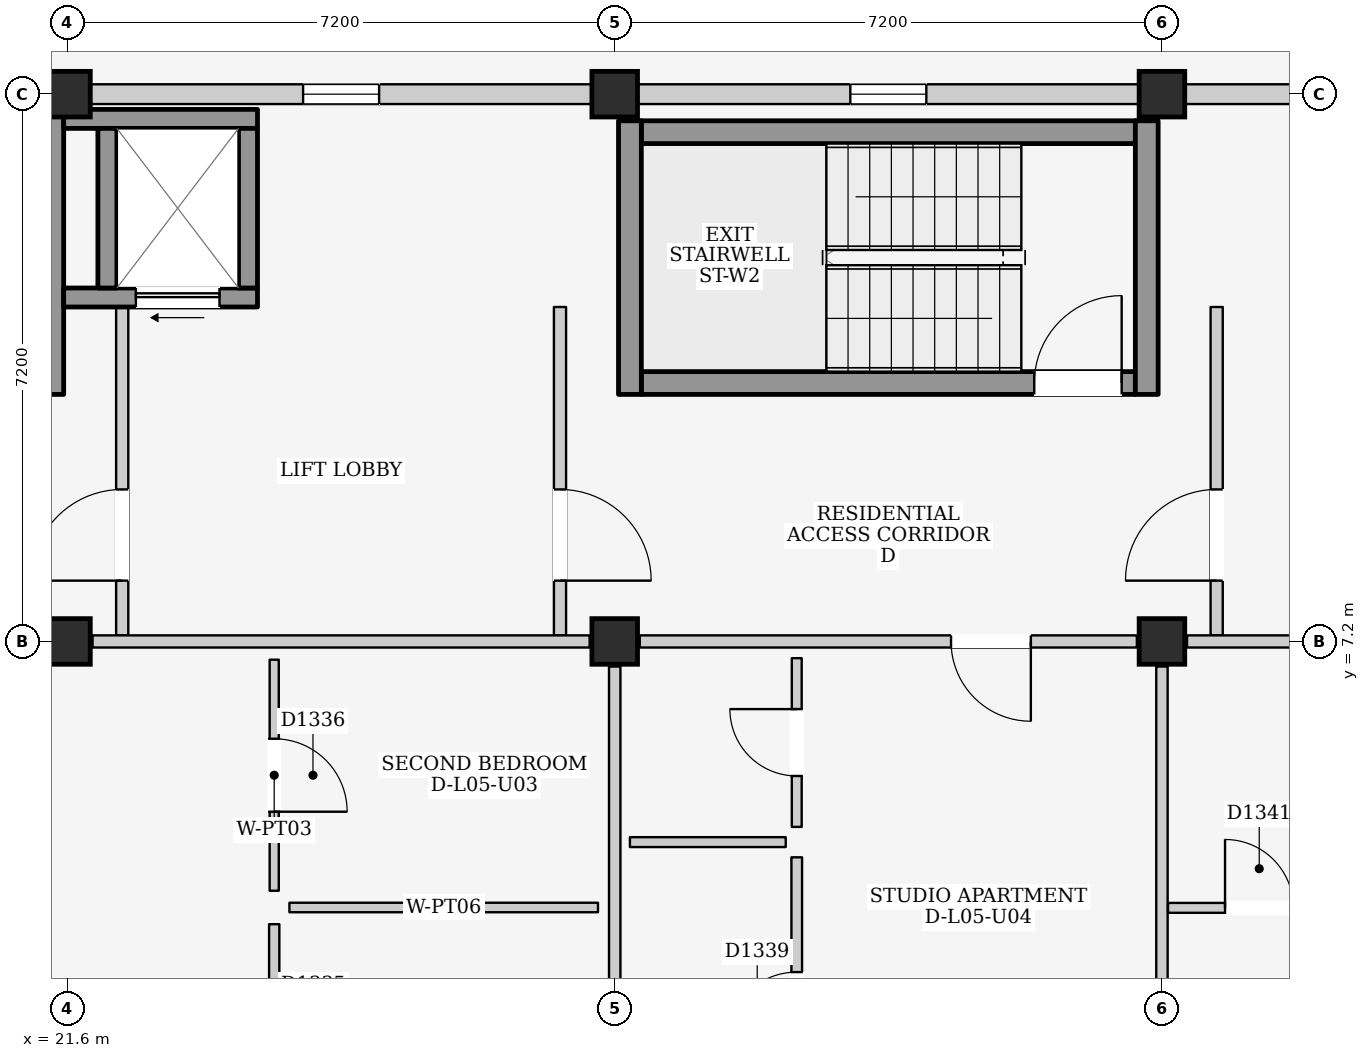
"""IFC4 building model, lengths in metres.
Left out: names, types, materials, properties, quantities, classifications, styles, units other than length and angle.
Written with IfcOpenShell. Run it as: python <this file> out.ifc"""

import sys

from ifc_helpers import new_model, si_unit, direction, frame, frame_2d, origin, origin_2d, place, context, subcontext, project, spatial, rectangle, extrude, element, fill, save


model = new_model("IFC4")
c1 = context("Model", 3, precision=1e-05, world=origin(), true_north=direction((0.0, 1.0)))
c2 = subcontext(c1, "Body", "Model", "MODEL_VIEW")
j1 = project(units=[si_unit("LENGTHUNIT", "METRE"), si_unit("PLANEANGLEUNIT", "RADIAN")], contexts=[c1])
p1 = place(None, origin())
s1 = spatial("IfcSite", under=j1, at=p1, CompositionType="ELEMENT")
p2 = place(p1, origin())
s2 = spatial("IfcBuilding", under=s1, at=p2, CompositionType="ELEMENT")
p3 = place(p2, frame((0.0, 0.0, 18.6)))
s3 = spatial("IfcBuildingStorey", under=s2, at=p3, CompositionType="ELEMENT", Elevation=18.6)
for number, where, z_axis, x_axis in (
    (1, (21.6, 7.2, 0.0), (0.0, 0.0, 1.0), (1.0, 0.0, 0.0)),
    (2, (21.6, 14.4, 0.0), (0.0, 0.0, 1.0), (1.0, 0.0, 0.0)),
    (3, (28.8, 7.2, 0.0), (0.0, 0.0, 1.0), (1.0, 0.0, 0.0)),
    (4, (28.8, 14.4, 0.0), (0.0, 0.0, 1.0), (1.0, 0.0, 0.0)),
    (5, (36.0, 7.2, 0.0), (0.0, 0.0, 1.0), (1.0, 0.0, 0.0)),
    (6, (36.0, 14.4, 0.0), (0.0, 0.0, 1.0), (1.0, 0.0, 0.0)),
):
    element("IfcColumn", number, at=place(p3, frame(where, z_axis=z_axis, x_axis=x_axis)), inside=s3, PredefinedType="COLUMN", context=c2, shape_type="SweptSolid", body=[
        extrude(rectangle(XDim=0.6, YDim=0.6, at=origin_2d()), origin(), (0.0, 0.0, 1.0), 3.3),
    ])
p4 = place(p3, frame((21.9, 14.4, 0.0), z_axis=(0.0, 0.0, 1.0), x_axis=(1.0, 0.0, 0.0)))
e7 = element("IfcWall", 7, at=p4, inside=s3, PredefinedType="ELEMENTEDWALL", context=c2, shape_type="SweptSolid", body=[
    extrude(rectangle(XDim=6.6, YDim=0.26, at=frame_2d((3.3, 0.0))), origin(), (0.0, 0.0, 1.0), 2.445),
])
p5 = place(p4, frame((2.8, 0.0, 1.2)))
e8 = element("IfcOpeningElement", 8, at=p5, cuts=e7, PredefinedType="OPENING", context=c2, shape_type="SweptSolid", body=[
    extrude(rectangle(XDim=1.0, YDim=0.9, at=frame_2d((0.5, 0.45))), frame((0.0, 0.145, 0.0), z_axis=(0.0, -1.0, 0.0), x_axis=(1.0, 0.0, 0.0)), (0.0, 0.0, 1.0), 0.29),
])
p6 = place(p3, frame((29.1, 14.4, 0.0), z_axis=(0.0, 0.0, 1.0), x_axis=(1.0, 0.0, 0.0)))
e9 = element("IfcWall", 9, at=p6, inside=s3, PredefinedType="ELEMENTEDWALL", context=c2, shape_type="SweptSolid", body=[
    extrude(rectangle(XDim=6.6, YDim=0.26, at=frame_2d((3.3, 0.0))), origin(), (0.0, 0.0, 1.0), 2.445),
])
p7 = place(p6, frame((2.8, 0.0, 1.2)))
e10 = element("IfcOpeningElement", 10, at=p7, cuts=e9, PredefinedType="OPENING", context=c2, shape_type="SweptSolid", body=[
    extrude(rectangle(XDim=1.0, YDim=0.9, at=frame_2d((0.5, 0.45))), frame((0.0, 0.145, 0.0), z_axis=(0.0, -1.0, 0.0), x_axis=(1.0, 0.0, 0.0)), (0.0, 0.0, 1.0), 0.29),
])
p8 = place(p3, frame((36.3, 14.4, 0.0), z_axis=(0.0, 0.0, 1.0), x_axis=(1.0, 0.0, 0.0)))
e11 = element("IfcWall", 11, at=p8, inside=s3, PredefinedType="ELEMENTEDWALL", context=c2, shape_type="SweptSolid", body=[
    extrude(rectangle(XDim=6.6, YDim=0.26, at=frame_2d((3.3, 0.0))), origin(), (0.0, 0.0, 1.0), 2.445),
])
p9 = place(p8, frame((2.8, 0.0, 1.2)))
e12 = element("IfcOpeningElement", 12, at=p9, cuts=e11, PredefinedType="OPENING", context=c2, shape_type="SweptSolid", body=[
    extrude(rectangle(XDim=1.0, YDim=0.9, at=frame_2d((0.5, 0.45))), frame((0.0, 0.145, 0.0), z_axis=(0.0, -1.0, 0.0), x_axis=(1.0, 0.0, 0.0)), (0.0, 0.0, 1.0), 0.29),
])
p10 = place(p3, frame((21.4, 10.45, 0.0), z_axis=(0.0, 0.0, 1.0), x_axis=(0.0, 1.0, 0.0)))
e13 = element("IfcWall", 13, at=p10, inside=s3, PredefinedType="SHEAR", context=c2, shape_type="SweptSolid", body=[
    extrude(rectangle(XDim=3.75, YDim=0.3, at=frame_2d((1.875, 0.0))), origin(), (0.0, 0.0, 1.0), 3.06),
])
p11 = place(p3, frame((22.32, 7.28, 0.0), z_axis=(0.0, 0.0, 1.0), x_axis=(0.0, 1.0, 0.0)))
e14 = element("IfcWall", 14, at=p11, inside=s3, PredefinedType="PARTITIONING", context=c2, shape_type="SweptSolid", body=[
    extrude(rectangle(XDim=4.32, YDim=0.16, at=frame_2d((2.16, 0.0))), origin(), (0.0, 0.0, 1.0), 3.06),
])
p12 = place(p11, frame((0.72, 0.0, 0.0)))
e15 = element("IfcOpeningElement", 15, at=p12, cuts=e14, PredefinedType="OPENING", context=c2, shape_type="SweptSolid", body=[
    extrude(rectangle(XDim=1.2, YDim=2.2, at=frame_2d((0.6, 1.1))), frame((0.0, 0.095, 0.0), z_axis=(0.0, -1.0, 0.0), x_axis=(1.0, 0.0, 0.0)), (0.0, 0.0, 1.0), 0.19),
])
p13 = place(p3, frame((28.08, 7.28, 0.0), z_axis=(0.0, 0.0, 1.0), x_axis=(0.0, 1.0, 0.0)))
e16 = element("IfcWall", 16, at=p13, inside=s3, PredefinedType="PARTITIONING", context=c2, shape_type="SweptSolid", body=[
    extrude(rectangle(XDim=4.32, YDim=0.16, at=frame_2d((2.16, 0.0))), origin(), (0.0, 0.0, 1.0), 3.06),
])
p14 = place(p13, frame((0.72, 0.0, 0.0)))
e17 = element("IfcOpeningElement", 17, at=p14, cuts=e16, PredefinedType="OPENING", context=c2, shape_type="SweptSolid", body=[
    extrude(rectangle(XDim=1.2, YDim=2.2, at=frame_2d((0.6, 1.1))), frame((0.0, 0.095, 0.0), z_axis=(0.0, -1.0, 0.0), x_axis=(1.0, 0.0, 0.0)), (0.0, 0.0, 1.0), 0.19),
])
p15 = place(p3, frame((21.55, 11.725, 0.0), z_axis=(0.0, 0.0, 1.0), x_axis=(1.0, 0.0, 0.0)))
e18 = element("IfcWall", 18, at=p15, inside=s3, PredefinedType="SHEAR", context=c2, shape_type="SweptSolid", body=[
    extrude(rectangle(XDim=2.55, YDim=0.25, at=frame_2d((1.275, 0.0))), origin(), (0.0, 0.0, 1.0), 3.06),
])
p16 = place(p15, frame((0.95, 0.0, 0.0)))
e19 = element("IfcOpeningElement", 19, at=p16, cuts=e18, PredefinedType="OPENING", context=c2, shape_type="SweptSolid", body=[
    extrude(rectangle(XDim=1.1, YDim=2.15, at=frame_2d((0.55, 1.075))), frame((0.0, 0.14, 0.0), z_axis=(0.0, -1.0, 0.0), x_axis=(1.0, 0.0, 0.0)), (0.0, 0.0, 1.0), 0.28),
])
p17 = place(p3, frame((21.55, 14.075, 0.0), z_axis=(0.0, 0.0, 1.0), x_axis=(1.0, 0.0, 0.0)))
e20 = element("IfcWall", 20, at=p17, inside=s3, PredefinedType="SHEAR", context=c2, shape_type="SweptSolid", body=[
    extrude(rectangle(XDim=2.55, YDim=0.25, at=frame_2d((1.275, 0.0))), origin(), (0.0, 0.0, 1.0), 3.06),
])
for number, where, z_axis, x_axis in (
    (21, (22.125, 11.85, 0.0), (0.0, 0.0, 1.0), (0.0, 1.0, 0.0)),
    (22, (23.975, 11.85, 0.0), (0.0, 0.0, 1.0), (0.0, 1.0, 0.0)),
):
    element("IfcWall", number, at=place(p3, frame(where, z_axis=z_axis, x_axis=x_axis)), inside=s3, PredefinedType="SHEAR", context=c2, shape_type="SweptSolid", body=[
        extrude(rectangle(XDim=2.1, YDim=0.25, at=frame_2d((1.05, 0.0))), origin(), (0.0, 0.0, 1.0), 3.06),
    ])
p18 = place(p3, frame((29.15, 10.6, 0.0), z_axis=(0.0, 0.0, 1.0), x_axis=(1.0, 0.0, 0.0)))
e23 = element("IfcWall", 23, at=p18, inside=s3, PredefinedType="SHEAR", context=c2, shape_type="SweptSolid", body=[
    extrude(rectangle(XDim=6.5, YDim=0.3, at=frame_2d((3.25, 0.0))), origin(), (0.0, 0.0, 1.0), 3.06),
])
p19 = place(p18, frame((5.17, 0.0, 0.0)))
e24 = element("IfcOpeningElement", 24, at=p19, cuts=e23, PredefinedType="OPENING", context=c2, shape_type="SweptSolid", body=[
    extrude(rectangle(XDim=1.15, YDim=2.2, at=frame_2d((0.575, 1.1))), frame((0.0, 0.165, 0.0), z_axis=(0.0, -1.0, 0.0), x_axis=(1.0, 0.0, 0.0)), (0.0, 0.0, 1.0), 0.33),
])
p20 = place(p3, frame((29.15, 13.9, 0.0), z_axis=(0.0, 0.0, 1.0), x_axis=(1.0, 0.0, 0.0)))
e25 = element("IfcWall", 25, at=p20, inside=s3, PredefinedType="SHEAR", context=c2, shape_type="SweptSolid", body=[
    extrude(rectangle(XDim=6.5, YDim=0.3, at=frame_2d((3.25, 0.0))), origin(), (0.0, 0.0, 1.0), 3.06),
])
for number, where, z_axis, x_axis in (
    (26, (29.0, 10.45, 0.0), (0.0, 0.0, 1.0), (0.0, 1.0, 0.0)),
    (27, (35.8, 10.45, 0.0), (0.0, 0.0, 1.0), (0.0, 1.0, 0.0)),
):
    element("IfcWall", number, at=place(p3, frame(where, z_axis=z_axis, x_axis=x_axis)), inside=s3, PredefinedType="SHEAR", context=c2, shape_type="SweptSolid", body=[
        extrude(rectangle(XDim=3.6, YDim=0.3, at=frame_2d((1.8, 0.0))), origin(), (0.0, 0.0, 1.0), 3.06),
    ])
p21 = place(p3, frame((36.72, 7.28, 0.0), z_axis=(0.0, 0.0, 1.0), x_axis=(0.0, 1.0, 0.0)))
e28 = element("IfcWall", 28, at=p21, inside=s3, PredefinedType="PARTITIONING", context=c2, shape_type="SweptSolid", body=[
    extrude(rectangle(XDim=4.32, YDim=0.16, at=frame_2d((2.16, 0.0))), origin(), (0.0, 0.0, 1.0), 3.06),
])
p22 = place(p21, frame((0.72, 0.0, 0.0)))
e29 = element("IfcOpeningElement", 29, at=p22, cuts=e28, PredefinedType="OPENING", context=c2, shape_type="SweptSolid", body=[
    extrude(rectangle(XDim=1.2, YDim=2.2, at=frame_2d((0.6, 1.1))), frame((0.0, 0.095, 0.0), z_axis=(0.0, -1.0, 0.0), x_axis=(1.0, 0.0, 0.0)), (0.0, 0.0, 1.0), 0.19),
])
p23 = place(p3, frame((21.93, 7.2, 0.0), z_axis=(0.0, 0.0, 1.0), x_axis=(1.0, 0.0, 0.0)))
e30 = element("IfcWall", 30, at=p23, inside=s3, PredefinedType="PARTITIONING", context=c2, shape_type="SweptSolid", body=[
    extrude(rectangle(XDim=6.54, YDim=0.16, at=frame_2d((3.27, 0.0))), origin(), (0.0, 0.0, 1.0), 2.445),
])
p24 = place(p3, frame((28.8, 0.33, 0.0), z_axis=(0.0, 0.0, 1.0), x_axis=(0.0, 1.0, 0.0)))
e31 = element("IfcWall", 31, at=p24, inside=s3, PredefinedType="PARTITIONING", context=c2, shape_type="SweptSolid", body=[
    extrude(rectangle(XDim=6.54, YDim=0.15, at=frame_2d((3.27, 0.0))), origin(), (0.0, 0.0, 1.0), 2.545),
])
p25 = place(p3, frame((24.32, 0.44, 0.0), z_axis=(0.0, 0.0, 1.0), x_axis=(0.0, 1.0, 0.0)))
e32 = element("IfcWall", 32, at=p25, inside=s3, PredefinedType="PARTITIONING", context=c2, shape_type="SweptSolid", body=[
    extrude(rectangle(XDim=3.04, YDim=0.135, at=frame_2d((1.52, 0.0))), origin(), (0.0, 0.0, 1.0), 3.06),
])
p26 = place(p25, frame((1.045, 0.0, 0.0)))
e33 = element("IfcOpeningElement", 33, at=p26, cuts=e32, PredefinedType="OPENING", context=c2, shape_type="SweptSolid", body=[
    extrude(rectangle(XDim=0.95, YDim=2.15, at=frame_2d((0.475, 1.075))), frame((0.0, 0.083, 0.0), z_axis=(0.0, -1.0, 0.0), x_axis=(1.0, 0.0, 0.0)), (0.0, 0.0, 1.0), 0.165),
])
p27 = place(p3, frame((24.52, 3.7, 0.0), z_axis=(0.0, 0.0, 1.0), x_axis=(1.0, 0.0, 0.0)))
e34 = element("IfcWall", 34, at=p27, inside=s3, PredefinedType="PARTITIONING", context=c2, shape_type="SweptSolid", body=[
    extrude(rectangle(XDim=4.06, YDim=0.125, at=frame_2d((2.03, 0.0))), origin(), (0.0, 0.0, 1.0), 3.06),
])
p28 = place(p3, frame((24.32, 3.92, 0.0), z_axis=(0.0, 0.0, 1.0), x_axis=(0.0, 1.0, 0.0)))
e35 = element("IfcWall", 35, at=p28, inside=s3, PredefinedType="PARTITIONING", context=c2, shape_type="SweptSolid", body=[
    extrude(rectangle(XDim=3.04, YDim=0.12, at=frame_2d((1.52, 0.0))), origin(), (0.0, 0.0, 1.0), 3.06),
])
p29 = place(p28, frame((1.04, 0.0, 0.0)))
e36 = element("IfcOpeningElement", 36, at=p29, cuts=e35, PredefinedType="OPENING", context=c2, shape_type="SweptSolid", body=[
    extrude(rectangle(XDim=0.96, YDim=2.15, at=frame_2d((0.48, 1.075))), frame((0.0, 0.075, 0.0), z_axis=(0.0, -1.0, 0.0), x_axis=(1.0, 0.0, 0.0)), (0.0, 0.0, 1.0), 0.15),
])
p30 = place(p3, frame((29.13, 7.2, 0.0), z_axis=(0.0, 0.0, 1.0), x_axis=(1.0, 0.0, 0.0)))
e37 = element("IfcWall", 37, at=p30, inside=s3, PredefinedType="PARTITIONING", context=c2, shape_type="SweptSolid", body=[
    extrude(rectangle(XDim=6.54, YDim=0.16, at=frame_2d((3.27, 0.0))), origin(), (0.0, 0.0, 1.0), 2.445),
])
p31 = place(p30, frame((4.095, 0.0, 0.0)))
e38 = element("IfcOpeningElement", 38, at=p31, cuts=e37, PredefinedType="OPENING", context=c2, shape_type="SweptSolid", body=[
    extrude(rectangle(XDim=1.05, YDim=2.15, at=frame_2d((0.525, 1.075))), frame((0.0, 0.095, 0.0), z_axis=(0.0, -1.0, 0.0), x_axis=(1.0, 0.0, 0.0)), (0.0, 0.0, 1.0), 0.19),
])
p32 = place(p3, frame((36.0, 0.33, 0.0), z_axis=(0.0, 0.0, 1.0), x_axis=(0.0, 1.0, 0.0)))
e39 = element("IfcWall", 39, at=p32, inside=s3, PredefinedType="PARTITIONING", context=c2, shape_type="SweptSolid", body=[
    extrude(rectangle(XDim=6.54, YDim=0.15, at=frame_2d((3.27, 0.0))), origin(), (0.0, 0.0, 1.0), 2.545),
])
p33 = place(p3, frame((29.0, 4.56, 0.0), z_axis=(0.0, 0.0, 1.0), x_axis=(1.0, 0.0, 0.0)))
e40 = element("IfcWall", 40, at=p33, inside=s3, PredefinedType="PARTITIONING", context=c2, shape_type="SweptSolid", body=[
    extrude(rectangle(XDim=2.05, YDim=0.13, at=frame_2d((1.025, 0.0))), origin(), (0.0, 0.0, 1.0), 3.06),
])
p34 = place(p3, frame((31.195, 4.76, 0.0), z_axis=(0.0, 0.0, 1.0), x_axis=(0.0, 1.0, 0.0)))
e41 = element("IfcWall", 41, at=p34, inside=s3, PredefinedType="PARTITIONING", context=c2, shape_type="SweptSolid", body=[
    extrude(rectangle(XDim=2.22, YDim=0.13, at=frame_2d((1.11, 0.0))), origin(), (0.0, 0.0, 1.0), 3.06),
])
p35 = place(p34, frame((0.67, 0.0, 0.0)))
e42 = element("IfcOpeningElement", 42, at=p35, cuts=e41, PredefinedType="OPENING", context=c2, shape_type="SweptSolid", body=[
    extrude(rectangle(XDim=0.88, YDim=2.1, at=frame_2d((0.44, 1.05))), frame((0.0, 0.08, 0.0), z_axis=(0.0, -1.0, 0.0), x_axis=(1.0, 0.0, 0.0)), (0.0, 0.0, 1.0), 0.16),
])
p36 = place(p3, frame((31.195, 0.42, 0.0), z_axis=(0.0, 0.0, 1.0), x_axis=(0.0, 1.0, 0.0)))
e43 = element("IfcWall", 43, at=p36, inside=s3, PredefinedType="PARTITIONING", context=c2, shape_type="SweptSolid", body=[
    extrude(rectangle(XDim=3.94, YDim=0.14, at=frame_2d((1.97, 0.0))), origin(), (0.0, 0.0, 1.0), 3.06),
])
p37 = place(p36, frame((1.51, 0.0, 0.0)))
e44 = element("IfcOpeningElement", 44, at=p37, cuts=e43, PredefinedType="OPENING", context=c2, shape_type="SweptSolid", body=[
    extrude(rectangle(XDim=0.92, YDim=2.1, at=frame_2d((0.46, 1.05))), frame((0.0, 0.085, 0.0), z_axis=(0.0, -1.0, 0.0), x_axis=(1.0, 0.0, 0.0)), (0.0, 0.0, 1.0), 0.17),
])
p38 = place(p3, frame((36.33, 7.2, 0.0), z_axis=(0.0, 0.0, 1.0), x_axis=(1.0, 0.0, 0.0)))
e45 = element("IfcWall", 45, at=p38, inside=s3, PredefinedType="PARTITIONING", context=c2, shape_type="SweptSolid", body=[
    extrude(rectangle(XDim=6.54, YDim=0.16, at=frame_2d((3.27, 0.0))), origin(), (0.0, 0.0, 1.0), 2.445),
])
p39 = place(p3, frame((36.08, 3.695, 0.0), z_axis=(0.0, 0.0, 1.0), x_axis=(1.0, 0.0, 0.0)))
e46 = element("IfcWall", 46, at=p39, inside=s3, PredefinedType="PARTITIONING", context=c2, shape_type="SweptSolid", body=[
    extrude(rectangle(XDim=2.4, YDim=0.13, at=frame_2d((1.2, 0.0))), origin(), (0.0, 0.0, 1.0), 3.06),
])
p40 = place(p39, frame((0.75, 0.0, 0.0)))
e47 = element("IfcOpeningElement", 47, at=p40, cuts=e46, PredefinedType="OPENING", context=c2, shape_type="SweptSolid", body=[
    extrude(rectangle(XDim=0.9, YDim=2.1, at=frame_2d((0.45, 1.05))), frame((0.0, 0.08, 0.0), z_axis=(0.0, -1.0, 0.0), x_axis=(1.0, 0.0, 0.0)), (0.0, 0.0, 1.0), 0.16),
])
p41 = place(p5, origin())
e48 = element("IfcWindow", 48, at=p41, inside=s3, PartitioningType="SINGLE_PANEL", PredefinedType="WINDOW", context=c2, shape_type="SweptSolid", body=[
    extrude(rectangle(XDim=1.0, YDim=0.9, at=frame_2d((0.5, 0.45))), frame((0.0, 0.03, 0.0), z_axis=(0.0, -1.0, 0.0), x_axis=(1.0, 0.0, 0.0)), (0.0, 0.0, 1.0), 0.06),
])
fill(e8, e48)
p42 = place(p7, origin())
e49 = element("IfcWindow", 49, at=p42, inside=s3, PartitioningType="SINGLE_PANEL", PredefinedType="WINDOW", context=c2, shape_type="SweptSolid", body=[
    extrude(rectangle(XDim=1.0, YDim=0.9, at=frame_2d((0.5, 0.45))), frame((0.0, 0.03, 0.0), z_axis=(0.0, -1.0, 0.0), x_axis=(1.0, 0.0, 0.0)), (0.0, 0.0, 1.0), 0.06),
])
fill(e10, e49)
p43 = place(p12, origin())
e50 = element("IfcDoor", 50, at=p43, inside=s3, OperationType="SINGLE_SWING_LEFT", PredefinedType="DOOR", context=c2, shape_type="SweptSolid", body=[
    extrude(rectangle(XDim=1.2, YDim=2.2, at=frame_2d((0.6, 1.1))), frame((0.0, 0.025, 0.0), z_axis=(0.0, -1.0, 0.0), x_axis=(1.0, 0.0, 0.0)), (0.0, 0.0, 1.0), 0.05),
])
fill(e15, e50)
p44 = place(p14, frame((1.2, 0.0, 0.0), z_axis=(0.0, 0.0, 1.0), x_axis=(-1.0, 0.0, 0.0)))
e51 = element("IfcDoor", 51, at=p44, inside=s3, OperationType="SINGLE_SWING_RIGHT", PredefinedType="DOOR", context=c2, shape_type="SweptSolid", body=[
    extrude(rectangle(XDim=1.2, YDim=2.2, at=frame_2d((0.6, 1.1))), frame((0.0, 0.025, 0.0), z_axis=(0.0, -1.0, 0.0), x_axis=(1.0, 0.0, 0.0)), (0.0, 0.0, 1.0), 0.05),
])
fill(e17, e51)
p45 = place(p16, frame((1.1, 0.0, 0.0), z_axis=(0.0, 0.0, 1.0), x_axis=(-1.0, 0.0, 0.0)))
e52 = element("IfcDoor", 52, at=p45, inside=s3, OperationType="SLIDING_TO_LEFT", PredefinedType="DOOR", context=c2, shape_type="SweptSolid", body=[
    extrude(rectangle(XDim=1.1, YDim=2.15, at=frame_2d((0.55, 1.075))), frame((0.0, 0.025, 0.0), z_axis=(0.0, -1.0, 0.0), x_axis=(1.0, 0.0, 0.0)), (0.0, 0.0, 1.0), 0.05),
])
fill(e19, e52)
p46 = place(p19, origin())
e53 = element("IfcDoor", 53, at=p46, inside=s3, OperationType="SINGLE_SWING_RIGHT", PredefinedType="DOOR", context=c2, shape_type="SweptSolid", body=[
    extrude(rectangle(XDim=1.15, YDim=2.2, at=frame_2d((0.575, 1.1))), frame((0.0, 0.025, 0.0), z_axis=(0.0, -1.0, 0.0), x_axis=(1.0, 0.0, 0.0)), (0.0, 0.0, 1.0), 0.05),
])
fill(e24, e53)
p47 = place(p22, origin())
e54 = element("IfcDoor", 54, at=p47, inside=s3, OperationType="SINGLE_SWING_LEFT", PredefinedType="DOOR", context=c2, shape_type="SweptSolid", body=[
    extrude(rectangle(XDim=1.2, YDim=2.2, at=frame_2d((0.6, 1.1))), frame((0.0, 0.025, 0.0), z_axis=(0.0, -1.0, 0.0), x_axis=(1.0, 0.0, 0.0)), (0.0, 0.0, 1.0), 0.05),
])
fill(e29, e54)
p48 = place(p29, frame((0.96, 0.0, 0.0), z_axis=(0.0, 0.0, 1.0), x_axis=(-1.0, 0.0, 0.0)))
e55 = element("IfcDoor", 55, at=p48, inside=s3, OperationType="SINGLE_SWING_RIGHT", PredefinedType="DOOR", context=c2, shape_type="SweptSolid", body=[
    extrude(rectangle(XDim=0.96, YDim=2.15, at=frame_2d((0.48, 1.075))), frame((0.0, 0.025, 0.0), z_axis=(0.0, -1.0, 0.0), x_axis=(1.0, 0.0, 0.0)), (0.0, 0.0, 1.0), 0.05),
])
fill(e36, e55)
p49 = place(p31, frame((1.05, 0.0, 0.0), z_axis=(0.0, 0.0, 1.0), x_axis=(-1.0, 0.0, 0.0)))
e56 = element("IfcDoor", 56, at=p49, inside=s3, OperationType="SINGLE_SWING_LEFT", PredefinedType="DOOR", context=c2, shape_type="SweptSolid", body=[
    extrude(rectangle(XDim=1.05, YDim=2.15, at=frame_2d((0.525, 1.075))), frame((0.0, 0.025, 0.0), z_axis=(0.0, -1.0, 0.0), x_axis=(1.0, 0.0, 0.0)), (0.0, 0.0, 1.0), 0.05),
])
fill(e38, e56)
p50 = place(p35, origin())
e57 = element("IfcDoor", 57, at=p50, inside=s3, OperationType="SINGLE_SWING_RIGHT", PredefinedType="DOOR", context=c2, shape_type="SweptSolid", body=[
    extrude(rectangle(XDim=0.88, YDim=2.1, at=frame_2d((0.44, 1.05))), frame((0.0, 0.025, 0.0), z_axis=(0.0, -1.0, 0.0), x_axis=(1.0, 0.0, 0.0)), (0.0, 0.0, 1.0), 0.05),
])
fill(e42, e57)
p51 = place(p37, origin())
e58 = element("IfcDoor", 58, at=p51, inside=s3, OperationType="SINGLE_SWING_LEFT", PredefinedType="DOOR", context=c2, shape_type="SweptSolid", body=[
    extrude(rectangle(XDim=0.92, YDim=2.1, at=frame_2d((0.46, 1.05))), frame((0.0, 0.025, 0.0), z_axis=(0.0, -1.0, 0.0), x_axis=(1.0, 0.0, 0.0)), (0.0, 0.0, 1.0), 0.05),
])
fill(e44, e58)
p52 = place(p40, origin())
e59 = element("IfcDoor", 59, at=p52, inside=s3, OperationType="SINGLE_SWING_LEFT", PredefinedType="DOOR", context=c2, shape_type="SweptSolid", body=[
    extrude(rectangle(XDim=0.9, YDim=2.1, at=frame_2d((0.45, 1.05))), frame((0.0, 0.025, 0.0), z_axis=(0.0, -1.0, 0.0), x_axis=(1.0, 0.0, 0.0)), (0.0, 0.0, 1.0), 0.05),
])
fill(e47, e59)
save(model, sys.argv[1])
